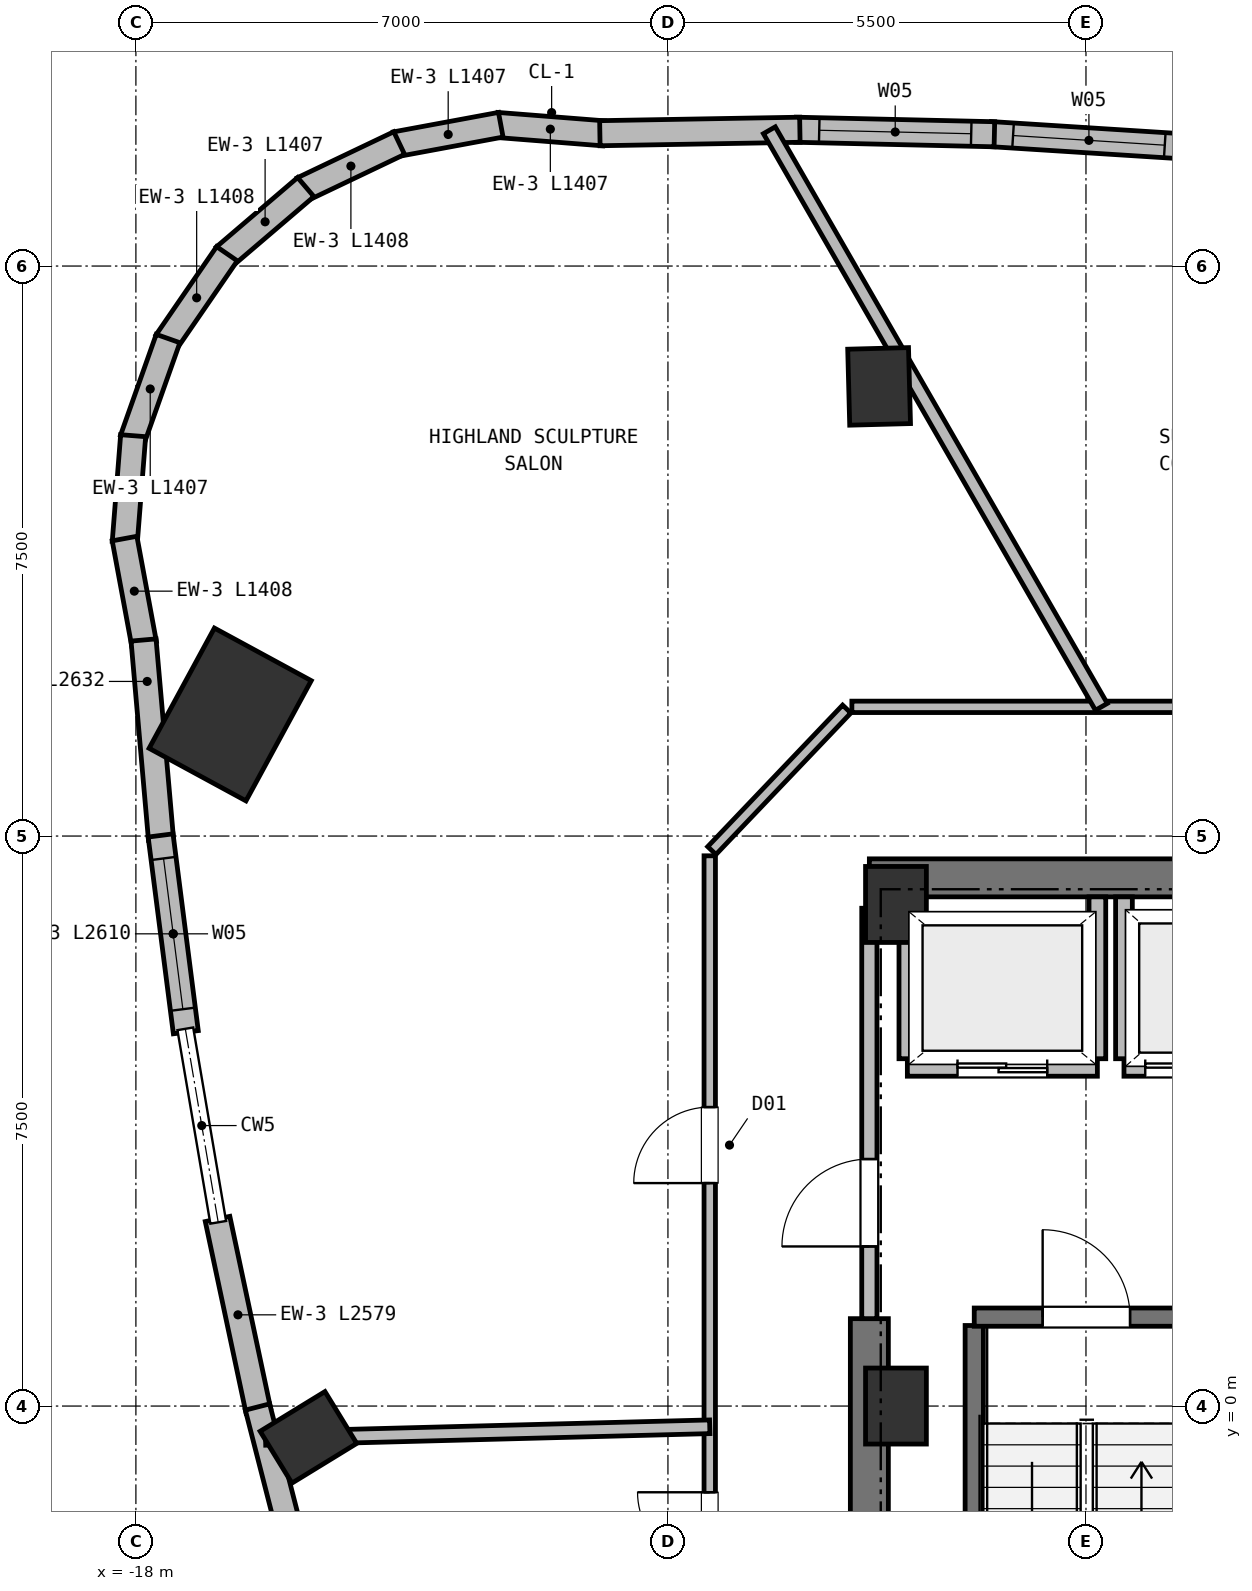
"""IFC4 building model, lengths in metres.
Left out: names, types, materials, properties, quantities, classifications, styles, units other than length and angle.
Written with IfcOpenShell. Run it as: python <this file> out.ifc"""

import sys

from ifc_helpers import new_model, si_unit, direction, frame, frame_2d, origin, origin_2d, place, context, subcontext, project, spatial, rectangle, extrude, element, fill, save


model = new_model("IFC4")
c1 = context("Model", 3, precision=1e-05, world=origin(), true_north=direction((0.0, 1.0)))
c2 = subcontext(c1, "Body", "Model", "MODEL_VIEW")
j1 = project(units=[si_unit("LENGTHUNIT", "METRE"), si_unit("PLANEANGLEUNIT", "RADIAN")], contexts=[c1])
p1 = place(None, origin())
s1 = spatial("IfcSite", under=j1, at=p1, CompositionType="ELEMENT")
p2 = place(p1, origin())
s2 = spatial("IfcBuilding", under=s1, at=p2, CompositionType="ELEMENT")
p3 = place(p2, frame((0.0, 0.0, 173.75)))
s3 = spatial("IfcBuildingStorey", under=s2, at=p3, CompositionType="ELEMENT", Elevation=173.75)
for number, where, z_axis, x_axis in (
    (1, (-8.0, 6.6, 0.0), (0.0, 0.0, 1.0), (1.0, 0.0, 0.0)),
    (2, (-8.0, 0.0, 0.0), (0.0, 0.0, 1.0), (1.0, 0.0, 0.0)),
):
    element("IfcColumn", number, at=place(p3, frame(where, z_axis=z_axis, x_axis=x_axis)), inside=s3, PredefinedType="COLUMN", context=c2, shape_type="SweptSolid", body=[
        extrude(rectangle(XDim=0.8, YDim=1.0, at=origin_2d()), origin(), (0.0, 0.0, 1.0), 4.5),
    ])
p4 = place(p3, frame((-8.35, 6.95, 0.0), z_axis=(0.0, 0.0, 1.0), x_axis=(1.0, 0.0, 0.0)))
e3 = element("IfcWall", 3, at=p4, inside=s3, PredefinedType="SHEAR", context=c2, shape_type="SweptSolid", body=[
    extrude(rectangle(XDim=16.7, YDim=0.5, at=frame_2d((8.35, 0.0))), origin(), (0.0, 0.0, 1.0), 4.21),
])
p5 = place(p3, frame((-8.35, -6.95, 0.0), z_axis=(0.0, 0.0, 1.0), x_axis=(0.0, 1.0, 0.0)))
e4 = element("IfcWall", 4, at=p5, inside=s3, PredefinedType="SHEAR", context=c2, shape_type="SweptSolid", body=[
    extrude(rectangle(XDim=8.1, YDim=0.5, at=frame_2d((4.05, 0.0))), origin(), (0.0, 0.0, 1.0), 4.21),
])
p6 = place(p3, frame((-16.76, 9.1, 0.0), z_axis=(0.0, 0.0, 1.0), x_axis=(-0.878817112662, 0.47715876026, 0.0)))
e5 = element("IfcColumn", 5, at=p6, inside=s3, PredefinedType="COLUMN", context=c2, shape_type="SweptSolid", body=[
    extrude(rectangle(XDim=1.45, YDim=1.8, at=origin_2d()), origin(), (0.0, 0.0, 1.0), 4.5),
])
for number, where, z_axis, x_axis in (
    (6, (-15.73, -0.412, 0.0), (0.0, 0.0, 1.0), (-0.522, 0.853, 0.0)),
    (7, (-8.222, 13.417, 0.0), (0.0, 0.0, 1.0), (1.0, 0.026, 0.0)),
):
    element("IfcColumn", number, at=place(p3, frame(where, z_axis=z_axis, x_axis=x_axis)), inside=s3, PredefinedType="COLUMN", context=c2, shape_type="SweptSolid", body=[
        extrude(rectangle(XDim=0.8, YDim=1.0, at=origin_2d()), origin(), (0.0, 0.0, 1.0), 4.5),
    ])
p7 = place(p3, frame((-13.249, 16.857, 0.0), z_axis=(0.0, 0.0, 1.0), x_axis=(0.996907811278, -0.07857999626, 0.0)))
e8 = element("IfcWall", 8, at=p7, inside=s3, PredefinedType="SOLIDWALL", context=c2, shape_type="SweptSolid", body=[
    extrude(rectangle(XDim=1.407, YDim=0.33, at=frame_2d((0.704, 0.0))), origin(), (0.0, 0.0, 1.0), 4.21),
])
for number, where, z_axis, x_axis in (
    (9, (-14.583, 16.603, 0.0), (0.0, 0.0, 1.0), (0.983, 0.182, 0.0)),
    (10, (-15.806, 16.012, 0.0), (0.0, 0.0, 1.0), (0.903, 0.43, 0.0)),
):
    element("IfcWall", number, at=place(p3, frame(where, z_axis=z_axis, x_axis=x_axis)), inside=s3, PredefinedType="SOLIDWALL", context=c2, shape_type="SweptSolid", body=[
        extrude(rectangle(XDim=1.408, YDim=0.33, at=frame_2d((0.704, 0.0))), origin(), (0.0, 0.0, 1.0), 4.21),
    ])
for number, where, z_axis, x_axis in (
    (11, (-16.835, 15.125, 0.0), (0.0, 0.0, 1.0), (0.76, 0.649, 0.0)),
    (12, (-17.599, 14.002, 0.0), (0.0, 0.0, 1.0), (0.566, 0.824, 0.0)),
):
    element("IfcWall", number, at=place(p3, frame(where, z_axis=z_axis, x_axis=x_axis)), inside=s3, PredefinedType="SOLIDWALL", context=c2, shape_type="SweptSolid", body=[
        extrude(rectangle(XDim=1.407, YDim=0.33, at=frame_2d((0.704, 0.0))), origin(), (0.0, 0.0, 1.0), 4.21),
    ])
p8 = place(p3, frame((-18.046, 12.719, 0.0), z_axis=(0.0, 0.0, 1.0), x_axis=(0.333709077945, 0.942676111555, 0.0)))
e13 = element("IfcWall", 13, at=p8, inside=s3, PredefinedType="SOLIDWALL", context=c2, shape_type="SweptSolid", body=[
    extrude(rectangle(XDim=1.408, YDim=0.33, at=frame_2d((0.704, 0.0))), origin(), (0.0, 0.0, 1.0), 4.21),
])
p9 = place(p3, frame((-18.146, 11.365, 0.0), z_axis=(0.0, 0.0, 1.0), x_axis=(0.078407598082, 0.996921385347, 0.0)))
e14 = element("IfcWall", 14, at=p9, inside=s3, PredefinedType="SOLIDWALL", context=c2, shape_type="SweptSolid", body=[
    extrude(rectangle(XDim=1.407, YDim=0.33, at=frame_2d((0.704, 0.0))), origin(), (0.0, 0.0, 1.0), 4.21),
])
p10 = place(p3, frame((-17.893, 10.03, 0.0), z_axis=(0.0, 0.0, 1.0), x_axis=(-0.182288002174, 0.983245180137, 0.0)))
e15 = element("IfcWall", 15, at=p10, inside=s3, PredefinedType="SOLIDWALL", context=c2, shape_type="SweptSolid", body=[
    extrude(rectangle(XDim=1.408, YDim=0.33, at=frame_2d((0.704, 0.0))), origin(), (0.0, 0.0, 1.0), 4.21),
])
p11 = place(p3, frame((-17.67, 7.458, 0.0), z_axis=(0.0, 0.0, 1.0), x_axis=(-0.087206078915, 0.996190292966, 0.0)))
e16 = element("IfcWall", 16, at=p11, inside=s3, PredefinedType="SOLIDWALL", context=c2, shape_type="SweptSolid", body=[
    extrude(rectangle(XDim=2.632, YDim=0.33, at=frame_2d((1.316, 0.0))), origin(), (0.0, 0.0, 1.0), 4.21),
])
p12 = place(p3, frame((-17.343, 4.919, 0.0), z_axis=(0.0, 0.0, 1.0), x_axis=(-0.127223311808, 0.991874099336, 0.0)))
e17 = element("IfcWall", 17, at=p12, inside=s3, PredefinedType="SOLIDWALL", context=c2, shape_type="SweptSolid", body=[
    extrude(rectangle(XDim=2.61, YDim=0.33, at=frame_2d((1.305, 0.0))), origin(), (0.0, 0.0, 1.0), 4.21),
])
p13 = place(p12, frame((0.305, 0.0, 0.72)))
e18 = element("IfcOpeningElement", 18, at=p13, cuts=e17, PredefinedType="OPENING", context=c2, shape_type="SweptSolid", body=[
    extrude(rectangle(XDim=2.0, YDim=2.15, at=frame_2d((1.0, 1.075))), frame((0.0, 0.175, 0.0), z_axis=(0.0, -1.0, 0.0), x_axis=(1.0, 0.0, 0.0)), (0.0, 0.0, 1.0), 0.35),
])
p14 = place(p3, frame((-16.389, -0.061, 0.0), z_axis=(0.0, 0.0, 1.0), x_axis=(-0.208022879961, 0.978123960146, 0.0)))
e19 = element("IfcWall", 19, at=p14, inside=s3, PredefinedType="SOLIDWALL", context=c2, shape_type="SweptSolid", body=[
    extrude(rectangle(XDim=2.58, YDim=0.33, at=frame_2d((1.29, 0.0))), origin(), (0.0, 0.0, 1.0), 4.21),
])
p15 = place(p3, frame((-15.761, -2.502, 0.0), z_axis=(0.0, 0.0, 1.0), x_axis=(-0.248743226802, 0.968569464272, 0.0)))
e20 = element("IfcWall", 20, at=p15, inside=s3, PredefinedType="SOLIDWALL", context=c2, shape_type="SweptSolid", body=[
    extrude(rectangle(XDim=2.571, YDim=0.33, at=frame_2d((1.285, 0.0))), origin(), (0.0, 0.0, 1.0), 4.21),
])
p16 = place(p3, frame((-6.755, 16.736, 0.0), z_axis=(0.0, 0.0, 1.0), x_axis=(0.99797748118, -0.06356844388, 0.0)))
e21 = element("IfcWall", 21, at=p16, inside=s3, PredefinedType="SOLIDWALL", context=c2, shape_type="SweptSolid", body=[
    extrude(rectangle(XDim=2.592, YDim=0.33, at=frame_2d((1.296, 0.0))), origin(), (0.0, 0.0, 1.0), 4.21),
])
p17 = place(p16, frame((0.296, 0.0, 0.72)))
e22 = element("IfcOpeningElement", 22, at=p17, cuts=e21, PredefinedType="OPENING", context=c2, shape_type="SweptSolid", body=[
    extrude(rectangle(XDim=2.0, YDim=2.15, at=frame_2d((1.0, 1.075))), frame((0.0, 0.175, 0.0), z_axis=(0.0, -1.0, 0.0), x_axis=(1.0, 0.0, 0.0)), (0.0, 0.0, 1.0), 0.35),
])
p18 = place(p3, frame((-9.314, 16.794, 0.0), z_axis=(0.0, 0.0, 1.0), x_axis=(0.999737324595, -0.022919027279, 0.0)))
e23 = element("IfcWall", 23, at=p18, inside=s3, PredefinedType="SOLIDWALL", context=c2, shape_type="SweptSolid", body=[
    extrude(rectangle(XDim=2.61, YDim=0.33, at=frame_2d((1.305, 0.0))), origin(), (0.0, 0.0, 1.0), 4.21),
])
p19 = place(p18, frame((0.305, 0.0, 0.72)))
e24 = element("IfcOpeningElement", 24, at=p19, cuts=e23, PredefinedType="OPENING", context=c2, shape_type="SweptSolid", body=[
    extrude(rectangle(XDim=2.0, YDim=2.15, at=frame_2d((1.0, 1.075))), frame((0.0, 0.175, 0.0), z_axis=(0.0, -1.0, 0.0), x_axis=(1.0, 0.0, 0.0)), (0.0, 0.0, 1.0), 0.35),
])
p20 = place(p3, frame((-11.896, 16.748, 0.0), z_axis=(0.0, 0.0, 1.0), x_axis=(0.999849492065, 0.017349156075, 0.0)))
e25 = element("IfcWall", 25, at=p20, inside=s3, PredefinedType="SOLIDWALL", context=c2, shape_type="SweptSolid", body=[
    extrude(rectangle(XDim=2.632, YDim=0.33, at=frame_2d((1.316, 0.0))), origin(), (0.0, 0.0, 1.0), 4.21),
])
p21 = place(p3, frame((-6.97, -6.16, 0.0), z_axis=(0.0, 0.0, 1.0), x_axis=(0.0, 1.0, 0.0)))
e26 = element("IfcWall", 26, at=p21, inside=s3, PredefinedType="SHEAR", context=c2, shape_type="SweptSolid", body=[
    extrude(rectangle(XDim=7.22, YDim=0.24, at=frame_2d((3.61, 0.0))), origin(), (0.0, 0.0, 1.0), 4.21),
])
p22 = place(p3, frame((-6.97, 1.17, 0.0), z_axis=(0.0, 0.0, 1.0), x_axis=(1.0, 0.0, 0.0)))
e27 = element("IfcWall", 27, at=p22, inside=s3, PredefinedType="SHEAR", context=c2, shape_type="SweptSolid", body=[
    extrude(rectangle(XDim=2.96, YDim=0.24, at=frame_2d((1.48, 0.0))), origin(), (0.0, 0.0, 1.0), 4.21),
])
p23 = place(p22, frame((0.9, 0.0, 0.0)))
e28 = element("IfcOpeningElement", 28, at=p23, cuts=e27, PredefinedType="OPENING", context=c2, shape_type="SweptSolid", body=[
    extrude(rectangle(XDim=1.15, YDim=2.15, at=frame_2d((0.575, 1.075))), frame((0.0, 0.13, 0.0), z_axis=(0.0, -1.0, 0.0), x_axis=(1.0, 0.0, 0.0)), (0.0, 0.0, 1.0), 0.26),
])
p24 = place(p3, frame((-7.85, 4.45, 0.0), z_axis=(0.0, 0.0, 1.0), x_axis=(1.0, 0.0, 0.0)))
e29 = element("IfcWall", 29, at=p24, inside=s3, PredefinedType="PARTITIONING", context=c2, shape_type="SweptSolid", body=[
    extrude(rectangle(XDim=2.5, YDim=0.22, at=frame_2d((1.25, 0.0))), origin(), (0.0, 0.0, 1.0), 4.21),
])
p25 = place(p24, frame((0.66, 0.0, 0.0)))
e30 = element("IfcOpeningElement", 30, at=p25, cuts=e29, PredefinedType="OPENING", context=c2, shape_type="SweptSolid", body=[
    extrude(rectangle(XDim=1.18, YDim=2.15, at=frame_2d((0.59, 1.075))), frame((0.0, 0.12, 0.0), z_axis=(0.0, -1.0, 0.0), x_axis=(1.0, 0.0, 0.0)), (0.0, 0.0, 1.0), 0.24),
])
p26 = place(p3, frame((-7.85, 4.57, 0.0), z_axis=(0.0, 0.0, 1.0), x_axis=(0.0, 1.0, 0.0)))
e31 = element("IfcWall", 31, at=p26, inside=s3, PredefinedType="PARTITIONING", context=c2, shape_type="SweptSolid", body=[
    extrude(rectangle(XDim=2.13, YDim=0.22, at=frame_2d((1.065, 0.0))), origin(), (0.0, 0.0, 1.0), 3.84),
])
p27 = place(p3, frame((-5.35, 4.57, 0.0), z_axis=(0.0, 0.0, 1.0), x_axis=(0.0, 1.0, 0.0)))
e32 = element("IfcWall", 32, at=p27, inside=s3, PredefinedType="PARTITIONING", context=c2, shape_type="SweptSolid", body=[
    extrude(rectangle(XDim=2.13, YDim=0.22, at=frame_2d((1.065, 0.0))), origin(), (0.0, 0.0, 1.0), 4.21),
])
p28 = place(p3, frame((-5.0, 4.45, 0.0), z_axis=(0.0, 0.0, 1.0), x_axis=(1.0, 0.0, 0.0)))
e33 = element("IfcWall", 33, at=p28, inside=s3, PredefinedType="PARTITIONING", context=c2, shape_type="SweptSolid", body=[
    extrude(rectangle(XDim=2.4, YDim=0.22, at=frame_2d((1.2, 0.0))), origin(), (0.0, 0.0, 1.0), 4.21),
])
p29 = place(p28, frame((0.28, 0.0, 0.0)))
e34 = element("IfcOpeningElement", 34, at=p29, cuts=e33, PredefinedType="OPENING", context=c2, shape_type="SweptSolid", body=[
    extrude(rectangle(XDim=1.22, YDim=2.15, at=frame_2d((0.61, 1.075))), frame((0.0, 0.12, 0.0), z_axis=(0.0, -1.0, 0.0), x_axis=(1.0, 0.0, 0.0)), (0.0, 0.0, 1.0), 0.24),
])
p30 = place(p3, frame((-5.0, 4.57, 0.0), z_axis=(0.0, 0.0, 1.0), x_axis=(0.0, 1.0, 0.0)))
e35 = element("IfcWall", 35, at=p30, inside=s3, PredefinedType="PARTITIONING", context=c2, shape_type="SweptSolid", body=[
    extrude(rectangle(XDim=2.13, YDim=0.22, at=frame_2d((1.065, 0.0))), origin(), (0.0, 0.0, 1.0), 4.21),
])
p31 = place(p3, frame((-8.35, 1.15, 0.0), z_axis=(0.0, 0.0, 1.0), x_axis=(0.0, 1.0, 0.0)))
e36 = element("IfcWall", 36, at=p31, inside=s3, PredefinedType="PARTITIONING", context=c2, shape_type="SweptSolid", body=[
    extrude(rectangle(XDim=5.4, YDim=0.2, at=frame_2d((2.7, 0.0))), origin(), (0.0, 0.0, 1.0), 4.21),
])
p32 = place(p31, frame((0.95, 0.0, 0.0)))
e37 = element("IfcOpeningElement", 37, at=p32, cuts=e36, PredefinedType="OPENING", context=c2, shape_type="SweptSolid", body=[
    extrude(rectangle(XDim=1.15, YDim=2.15, at=frame_2d((0.575, 1.075))), frame((0.0, 0.11, 0.0), z_axis=(0.0, -1.0, 0.0), x_axis=(1.0, 0.0, 0.0)), (0.0, 0.0, 1.0), 0.22),
])
p33 = place(p3, frame((-8.58, 9.2, 0.0), z_axis=(0.0, 0.0, 1.0), x_axis=(1.0, 0.0, 0.0)))
e38 = element("IfcWall", 38, at=p33, inside=s3, PredefinedType="PARTITIONING", context=c2, shape_type="SweptSolid", body=[
    extrude(rectangle(XDim=17.16, YDim=0.15, at=frame_2d((8.58, 0.0))), origin(), (0.0, 0.0, 1.0), 4.21),
])
p34 = place(p33, frame((8.625, 0.0, 0.0)))
e39 = element("IfcOpeningElement", 39, at=p34, cuts=e38, PredefinedType="OPENING", context=c2, shape_type="SweptSolid", body=[
    extrude(rectangle(XDim=1.0, YDim=2.15, at=frame_2d((0.5, 1.075))), frame((0.0, 0.085, 0.0), z_axis=(0.0, -1.0, 0.0), x_axis=(1.0, 0.0, 0.0)), (0.0, 0.0, 1.0), 0.17),
])
p35 = place(p3, frame((-10.422, 7.309, 0.0), z_axis=(0.0, 0.0, 1.0), x_axis=(0.689960858356, 0.723846678473, 0.0)))
e40 = element("IfcWall", 40, at=p35, inside=s3, PredefinedType="PARTITIONING", context=c2, shape_type="SweptSolid", body=[
    extrude(rectangle(XDim=2.572, YDim=0.15, at=frame_2d((1.286, 0.0))), origin(), (0.0, 0.0, 1.0), 4.21),
])
p36 = place(p3, frame((-10.45, -7.24, 0.0), z_axis=(0.0, 0.0, 1.0), x_axis=(0.0, 1.0, 0.0)))
e41 = element("IfcWall", 41, at=p36, inside=s3, PredefinedType="PARTITIONING", context=c2, shape_type="SweptSolid", body=[
    extrude(rectangle(XDim=14.48, YDim=0.15, at=frame_2d((7.24, 0.0))), origin(), (0.0, 0.0, 1.0), 3.89),
])
p37 = place(p36, frame((2.632, 0.0, 0.0)))
e42 = element("IfcOpeningElement", 42, at=p37, cuts=e41, PredefinedType="OPENING", context=c2, shape_type="SweptSolid", body=[
    extrude(rectangle(XDim=0.95, YDim=2.1, at=frame_2d((0.475, 1.05))), frame((0.0, 0.085, 0.0), z_axis=(0.0, -1.0, 0.0), x_axis=(1.0, 0.0, 0.0)), (0.0, 0.0, 1.0), 0.17),
])
p38 = place(p36, frame((0.14, 0.0, 0.0)))
e43 = element("IfcOpeningElement", 43, at=p38, cuts=e41, PredefinedType="OPENING", context=c2, shape_type="SweptSolid", body=[
    extrude(rectangle(XDim=0.95, YDim=2.1, at=frame_2d((0.475, 1.05))), frame((0.0, 0.085, 0.0), z_axis=(0.0, -1.0, 0.0), x_axis=(1.0, 0.0, 0.0)), (0.0, 0.0, 1.0), 0.17),
])
p39 = place(p36, frame((5.156, 0.0, 0.0)))
e44 = element("IfcOpeningElement", 44, at=p39, cuts=e41, PredefinedType="OPENING", context=c2, shape_type="SweptSolid", body=[
    extrude(rectangle(XDim=0.95, YDim=2.1, at=frame_2d((0.475, 1.05))), frame((0.0, 0.085, 0.0), z_axis=(0.0, -1.0, 0.0), x_axis=(1.0, 0.0, 0.0)), (0.0, 0.0, 1.0), 0.17),
])
p40 = place(p36, frame((10.174, 0.0, 0.0)))
e45 = element("IfcOpeningElement", 45, at=p40, cuts=e41, PredefinedType="OPENING", context=c2, shape_type="SweptSolid", body=[
    extrude(rectangle(XDim=1.0, YDim=2.15, at=frame_2d((0.5, 1.075))), frame((0.0, 0.085, 0.0), z_axis=(0.0, -1.0, 0.0), x_axis=(1.0, 0.0, 0.0)), (0.0, 0.0, 1.0), 0.17),
])
p41 = place(p3, frame((-5.297, 9.2, 0.0), z_axis=(0.0, 0.0, 1.0), x_axis=(-0.498971426458, 0.866618437133, 0.0)))
e46 = element("IfcWall", 46, at=p41, inside=s3, PredefinedType="PARTITIONING", context=c2, shape_type="SweptSolid", body=[
    extrude(rectangle(XDim=8.754, YDim=0.18, at=frame_2d((4.377, 0.0))), origin(), (0.0, 0.0, 1.0), 4.21),
])
p42 = place(p3, frame((-10.45, -0.273, 0.0), z_axis=(0.0, 0.0, 1.0), x_axis=(-0.999660448282, -0.026057400883, 0.0)))
e47 = element("IfcWall", 47, at=p42, inside=s3, PredefinedType="PARTITIONING", context=c2, shape_type="SweptSolid", body=[
    extrude(rectangle(XDim=5.846, YDim=0.18, at=frame_2d((2.923, 0.0))), origin(), (0.0, 0.0, 1.0), 3.74),
])
p43 = place(p13, origin())
e48 = element("IfcWindow", 48, at=p43, inside=s3, PartitioningType="SINGLE_PANEL", PredefinedType="WINDOW", context=c2, shape_type="SweptSolid", body=[
    extrude(rectangle(XDim=2.0, YDim=2.15, at=frame_2d((1.0, 1.075))), frame((0.0, 0.03, 0.0), z_axis=(0.0, -1.0, 0.0), x_axis=(1.0, 0.0, 0.0)), (0.0, 0.0, 1.0), 0.06),
])
fill(e18, e48)
p44 = place(p17, origin())
e49 = element("IfcWindow", 49, at=p44, inside=s3, PartitioningType="SINGLE_PANEL", PredefinedType="WINDOW", context=c2, shape_type="SweptSolid", body=[
    extrude(rectangle(XDim=2.0, YDim=2.15, at=frame_2d((1.0, 1.075))), frame((0.0, 0.03, 0.0), z_axis=(0.0, -1.0, 0.0), x_axis=(1.0, 0.0, 0.0)), (0.0, 0.0, 1.0), 0.06),
])
fill(e22, e49)
p45 = place(p19, origin())
e50 = element("IfcWindow", 50, at=p45, inside=s3, PartitioningType="SINGLE_PANEL", PredefinedType="WINDOW", context=c2, shape_type="SweptSolid", body=[
    extrude(rectangle(XDim=2.0, YDim=2.15, at=frame_2d((1.0, 1.075))), frame((0.0, 0.03, 0.0), z_axis=(0.0, -1.0, 0.0), x_axis=(1.0, 0.0, 0.0)), (0.0, 0.0, 1.0), 0.06),
])
fill(e24, e50)
p46 = place(p23, origin())
e51 = element("IfcDoor", 51, at=p46, inside=s3, OperationType="SINGLE_SWING_LEFT", PredefinedType="DOOR", context=c2, shape_type="SweptSolid", body=[
    extrude(rectangle(XDim=1.15, YDim=2.15, at=frame_2d((0.575, 1.075))), frame((0.0, 0.025, 0.0), z_axis=(0.0, -1.0, 0.0), x_axis=(1.0, 0.0, 0.0)), (0.0, 0.0, 1.0), 0.05),
])
fill(e28, e51)
p47 = place(p25, origin())
e52 = element("IfcDoor", 52, at=p47, inside=s3, OperationType="DOUBLE_DOOR_SLIDING", PredefinedType="DOOR", context=c2, shape_type="SweptSolid", body=[
    extrude(rectangle(XDim=1.18, YDim=2.15, at=frame_2d((0.59, 1.075))), frame((0.0, 0.025, 0.0), z_axis=(0.0, -1.0, 0.0), x_axis=(1.0, 0.0, 0.0)), (0.0, 0.0, 1.0), 0.05),
])
fill(e30, e52)
p48 = place(p29, origin())
e53 = element("IfcDoor", 53, at=p48, inside=s3, OperationType="DOUBLE_DOOR_SLIDING", PredefinedType="DOOR", context=c2, shape_type="SweptSolid", body=[
    extrude(rectangle(XDim=1.22, YDim=2.15, at=frame_2d((0.61, 1.075))), frame((0.0, 0.025, 0.0), z_axis=(0.0, -1.0, 0.0), x_axis=(1.0, 0.0, 0.0)), (0.0, 0.0, 1.0), 0.05),
])
fill(e34, e53)
p49 = place(p32, origin())
e54 = element("IfcDoor", 54, at=p49, inside=s3, OperationType="SINGLE_SWING_LEFT", PredefinedType="DOOR", context=c2, shape_type="SweptSolid", body=[
    extrude(rectangle(XDim=1.15, YDim=2.15, at=frame_2d((0.575, 1.075))), frame((0.0, 0.025, 0.0), z_axis=(0.0, -1.0, 0.0), x_axis=(1.0, 0.0, 0.0)), (0.0, 0.0, 1.0), 0.05),
])
fill(e37, e54)
p50 = place(p39, origin())
e55 = element("IfcDoor", 55, at=p50, inside=s3, OperationType="SINGLE_SWING_RIGHT", PredefinedType="DOOR", context=c2, shape_type="SweptSolid", body=[
    extrude(rectangle(XDim=0.95, YDim=2.1, at=frame_2d((0.475, 1.05))), frame((0.0, 0.025, 0.0), z_axis=(0.0, -1.0, 0.0), x_axis=(1.0, 0.0, 0.0)), (0.0, 0.0, 1.0), 0.05),
])
fill(e44, e55)
p51 = place(p40, origin())
e56 = element("IfcDoor", 56, at=p51, inside=s3, OperationType="SINGLE_SWING_LEFT", PredefinedType="DOOR", context=c2, shape_type="SweptSolid", body=[
    extrude(rectangle(XDim=1.0, YDim=2.15, at=frame_2d((0.5, 1.075))), frame((0.0, 0.025, 0.0), z_axis=(0.0, -1.0, 0.0), x_axis=(1.0, 0.0, 0.0)), (0.0, 0.0, 1.0), 0.05),
])
fill(e45, e56)
save(model, sys.argv[1])
